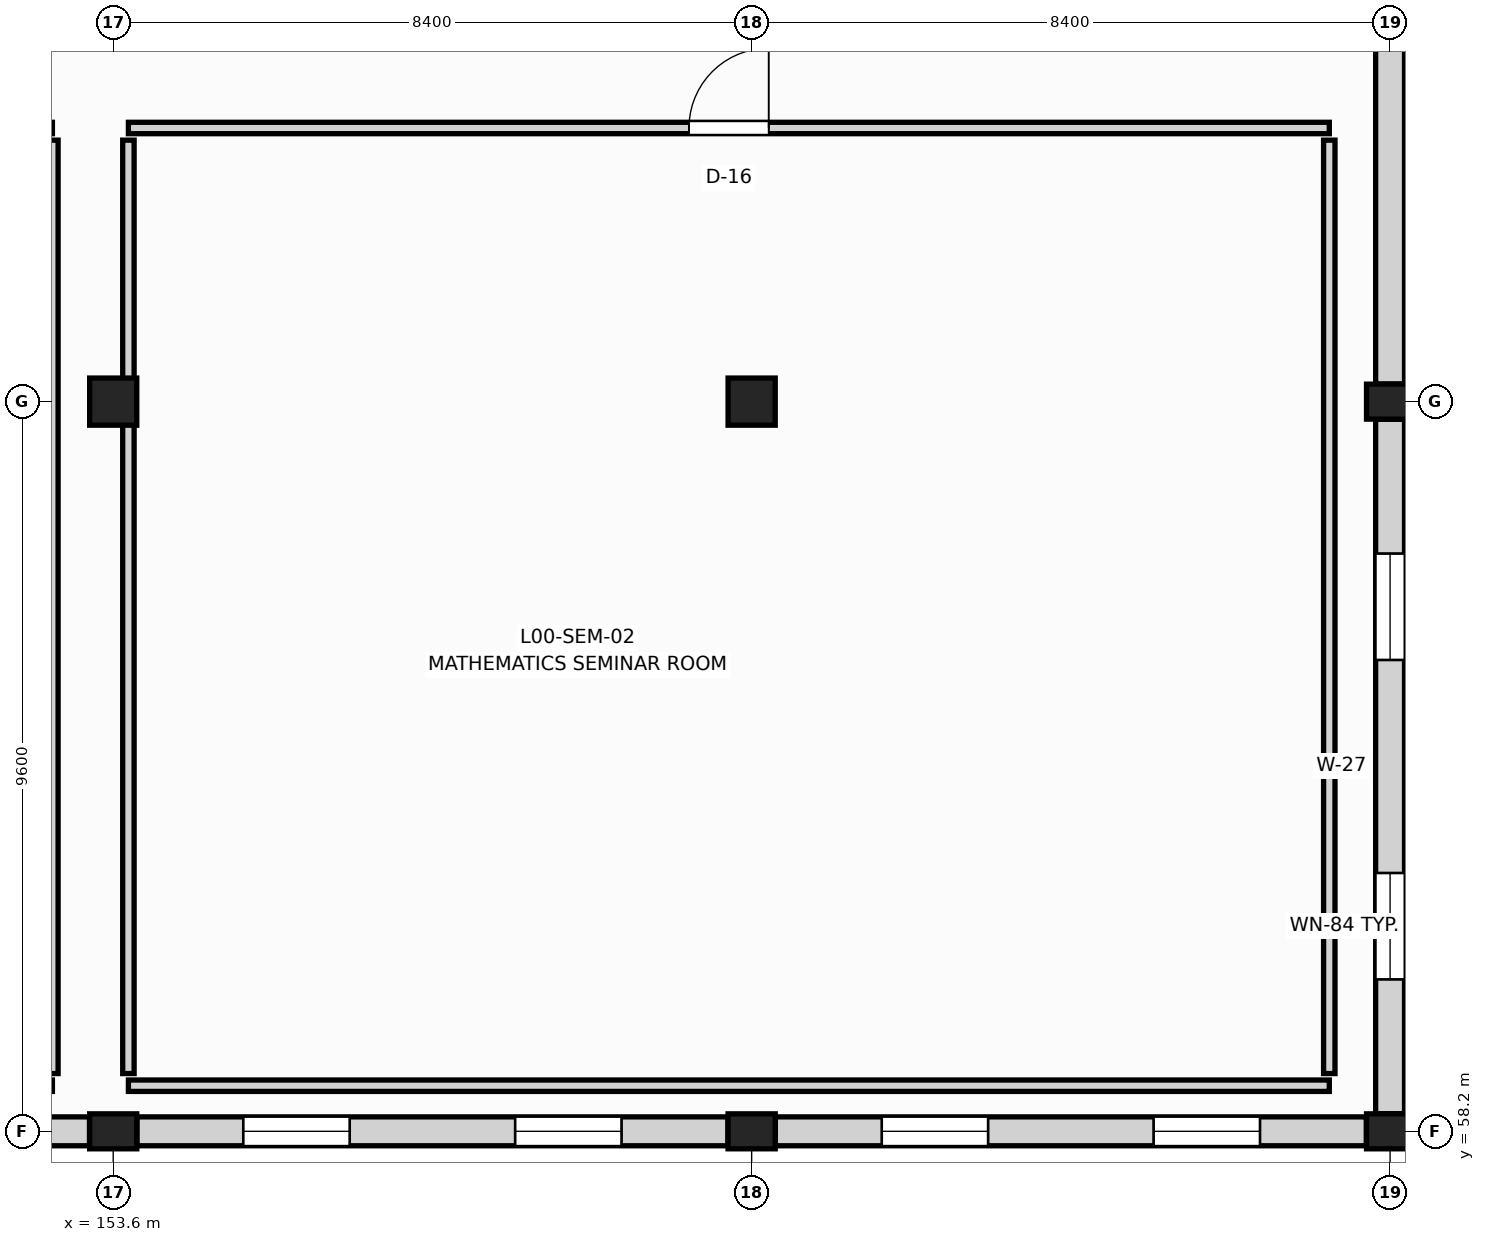
"""IFC4 building model, lengths in metres.
Left out: names, types, materials, properties, quantities, classifications, styles, units other than length and angle.
Written with IfcOpenShell. Run it as: python <this file> out.ifc"""

import sys

from ifc_helpers import new_model, si_unit, direction, frame, frame_2d, origin, origin_2d, place, context, subcontext, project, spatial, rectangle, extrude, element, fill, save


model = new_model("IFC4")
c1 = context("Model", 3, precision=1e-05, world=origin(), true_north=direction((0.0, 1.0)))
c2 = subcontext(c1, "Body", "Model", "MODEL_VIEW")
j1 = project(units=[si_unit("LENGTHUNIT", "METRE"), si_unit("PLANEANGLEUNIT", "RADIAN")], contexts=[c1])
p1 = place(None, origin())
s1 = spatial("IfcSite", under=j1, at=p1, CompositionType="ELEMENT")
p2 = place(p1, origin())
s2 = spatial("IfcBuilding", under=s1, at=p2, CompositionType="ELEMENT")
p3 = place(p2, origin())
s3 = spatial("IfcBuildingStorey", under=s2, at=p3, CompositionType="ELEMENT", Elevation=0.0)
p4 = place(p3, frame((153.6, 58.2, 0.0), z_axis=(0.0, 0.0, 1.0), x_axis=(1.0, 0.0, 0.0)))
e1 = element("IfcColumn", 1, at=p4, inside=s3, PredefinedType="COLUMN", context=c2, shape_type="SweptSolid", body=[
    extrude(rectangle(XDim=0.62, YDim=0.46, at=origin_2d()), origin(), (0.0, 0.0, 1.0), 5.08),
])
p5 = place(p3, frame((153.6, 67.8, 0.0), z_axis=(0.0, 0.0, 1.0), x_axis=(1.0, 0.0, 0.0)))
e2 = element("IfcColumn", 2, at=p5, inside=s3, PredefinedType="COLUMN", context=c2, shape_type="SweptSolid", body=[
    extrude(rectangle(XDim=0.62, YDim=0.62, at=origin_2d()), origin(), (0.0, 0.0, 1.0), 5.08),
])
p6 = place(p3, frame((162.0, 58.2, 0.0), z_axis=(0.0, 0.0, 1.0), x_axis=(1.0, 0.0, 0.0)))
e3 = element("IfcColumn", 3, at=p6, inside=s3, PredefinedType="COLUMN", context=c2, shape_type="SweptSolid", body=[
    extrude(rectangle(XDim=0.62, YDim=0.46, at=origin_2d()), origin(), (0.0, 0.0, 1.0), 5.08),
])
p7 = place(p3, frame((162.0, 67.8, 0.0), z_axis=(0.0, 0.0, 1.0), x_axis=(1.0, 0.0, 0.0)))
e4 = element("IfcColumn", 4, at=p7, inside=s3, PredefinedType="COLUMN", context=c2, shape_type="SweptSolid", body=[
    extrude(rectangle(XDim=0.62, YDim=0.62, at=origin_2d()), origin(), (0.0, 0.0, 1.0), 5.08),
])
for number, where, z_axis, x_axis in (
    (5, (170.4, 58.2, 0.0), (0.0, 0.0, 1.0), (1.0, 0.0, 0.0)),
    (6, (170.4, 67.8, 0.0), (0.0, 0.0, 1.0), (1.0, 0.0, 0.0)),
):
    element("IfcColumn", number, at=place(p3, frame(where, z_axis=z_axis, x_axis=x_axis)), inside=s3, PredefinedType="COLUMN", context=c2, shape_type="SweptSolid", body=[
        extrude(rectangle(XDim=0.62, YDim=0.46, at=origin_2d()), origin(), (0.0, 0.0, 1.0), 5.08),
    ])
p8 = place(p3, frame((170.4, 58.432, 0.0), z_axis=(0.0, 0.0, 1.0), x_axis=(0.0, 1.0, 0.0)))
e7 = element("IfcWall", 7, at=p8, inside=s3, PredefinedType="SOLIDWALL", context=c2, shape_type="SweptSolid", body=[
    extrude(rectangle(XDim=9.136, YDim=0.38, at=frame_2d((4.568, 0.0))), origin(), (0.0, 0.0, 1.0), 4.28),
])
p9 = place(p8, frame((1.767, 0.0, 0.85)))
e8 = element("IfcOpeningElement", 8, at=p9, cuts=e7, PredefinedType="OPENING", context=c2, shape_type="SweptSolid", body=[
    extrude(rectangle(XDim=1.4, YDim=1.65, at=frame_2d((0.7, 0.825))), frame((0.0, 0.2, 0.0), z_axis=(0.0, -1.0, 0.0), x_axis=(1.0, 0.0, 0.0)), (0.0, 0.0, 1.0), 0.4),
])
p10 = place(p8, frame((5.969, 0.0, 0.85)))
e9 = element("IfcOpeningElement", 9, at=p10, cuts=e7, PredefinedType="OPENING", context=c2, shape_type="SweptSolid", body=[
    extrude(rectangle(XDim=1.4, YDim=1.65, at=frame_2d((0.7, 0.825))), frame((0.0, 0.2, 0.0), z_axis=(0.0, -1.0, 0.0), x_axis=(1.0, 0.0, 0.0)), (0.0, 0.0, 1.0), 0.4),
])
p11 = place(p3, frame((170.4, 68.032, 0.0), z_axis=(0.0, 0.0, 1.0), x_axis=(0.0, 1.0, 0.0)))
e10 = element("IfcWall", 10, at=p11, inside=s3, PredefinedType="SOLIDWALL", context=c2, shape_type="SweptSolid", body=[
    extrude(rectangle(XDim=9.136, YDim=0.38, at=frame_2d((4.568, 0.0))), origin(), (0.0, 0.0, 1.0), 4.28),
])
p12 = place(p11, frame((4.618, 0.0, 0.0)))
e11 = element("IfcOpeningElement", 11, at=p12, cuts=e10, PredefinedType="OPENING", context=c2, shape_type="SweptSolid", body=[
    extrude(rectangle(XDim=1.5, YDim=2.2, at=frame_2d((0.75, 1.1))), frame((0.0, 0.2, 0.0), z_axis=(0.0, -1.0, 0.0), x_axis=(1.0, 0.0, 0.0)), (0.0, 0.0, 1.0), 0.4),
])
p13 = place(p3, frame((145.512, 58.2, 0.0), z_axis=(0.0, 0.0, 1.0), x_axis=(1.0, 0.0, 0.0)))
e12 = element("IfcWall", 12, at=p13, inside=s3, PredefinedType="SOLIDWALL", context=c2, shape_type="SweptSolid", body=[
    extrude(rectangle(XDim=7.776, YDim=0.38, at=frame_2d((3.888, 0.0))), origin(), (0.0, 0.0, 1.0), 4.28),
])
p14 = place(p13, frame((1.399, 0.0, 0.85)))
e13 = element("IfcOpeningElement", 13, at=p14, cuts=e12, PredefinedType="OPENING", context=c2, shape_type="SweptSolid", body=[
    extrude(rectangle(XDim=1.4, YDim=1.65, at=frame_2d((0.7, 0.825))), frame((0.0, 0.2, 0.0), z_axis=(0.0, -1.0, 0.0), x_axis=(1.0, 0.0, 0.0)), (0.0, 0.0, 1.0), 0.4),
])
p15 = place(p13, frame((4.977, 0.0, 0.85)))
e14 = element("IfcOpeningElement", 14, at=p15, cuts=e12, PredefinedType="OPENING", context=c2, shape_type="SweptSolid", body=[
    extrude(rectangle(XDim=1.4, YDim=1.65, at=frame_2d((0.7, 0.825))), frame((0.0, 0.2, 0.0), z_axis=(0.0, -1.0, 0.0), x_axis=(1.0, 0.0, 0.0)), (0.0, 0.0, 1.0), 0.4),
])
p16 = place(p3, frame((153.912, 58.2, 0.0), z_axis=(0.0, 0.0, 1.0), x_axis=(1.0, 0.0, 0.0)))
e15 = element("IfcWall", 15, at=p16, inside=s3, PredefinedType="SOLIDWALL", context=c2, shape_type="SweptSolid", body=[
    extrude(rectangle(XDim=7.776, YDim=0.38, at=frame_2d((3.888, 0.0))), origin(), (0.0, 0.0, 1.0), 4.28),
])
p17 = place(p16, frame((1.399, 0.0, 0.85)))
e16 = element("IfcOpeningElement", 16, at=p17, cuts=e15, PredefinedType="OPENING", context=c2, shape_type="SweptSolid", body=[
    extrude(rectangle(XDim=1.4, YDim=1.65, at=frame_2d((0.7, 0.825))), frame((0.0, 0.2, 0.0), z_axis=(0.0, -1.0, 0.0), x_axis=(1.0, 0.0, 0.0)), (0.0, 0.0, 1.0), 0.4),
])
p18 = place(p16, frame((4.977, 0.0, 0.85)))
e17 = element("IfcOpeningElement", 17, at=p18, cuts=e15, PredefinedType="OPENING", context=c2, shape_type="SweptSolid", body=[
    extrude(rectangle(XDim=1.4, YDim=1.65, at=frame_2d((0.7, 0.825))), frame((0.0, 0.2, 0.0), z_axis=(0.0, -1.0, 0.0), x_axis=(1.0, 0.0, 0.0)), (0.0, 0.0, 1.0), 0.4),
])
p19 = place(p3, frame((162.312, 58.2, 0.0), z_axis=(0.0, 0.0, 1.0), x_axis=(1.0, 0.0, 0.0)))
e18 = element("IfcWall", 18, at=p19, inside=s3, PredefinedType="SOLIDWALL", context=c2, shape_type="SweptSolid", body=[
    extrude(rectangle(XDim=7.776, YDim=0.38, at=frame_2d((3.888, 0.0))), origin(), (0.0, 0.0, 1.0), 4.28),
])
p20 = place(p19, frame((1.399, 0.0, 0.85)))
e19 = element("IfcOpeningElement", 19, at=p20, cuts=e18, PredefinedType="OPENING", context=c2, shape_type="SweptSolid", body=[
    extrude(rectangle(XDim=1.4, YDim=1.65, at=frame_2d((0.7, 0.825))), frame((0.0, 0.2, 0.0), z_axis=(0.0, -1.0, 0.0), x_axis=(1.0, 0.0, 0.0)), (0.0, 0.0, 1.0), 0.4),
])
p21 = place(p19, frame((4.977, 0.0, 0.85)))
e20 = element("IfcOpeningElement", 20, at=p21, cuts=e18, PredefinedType="OPENING", context=c2, shape_type="SweptSolid", body=[
    extrude(rectangle(XDim=1.4, YDim=1.65, at=frame_2d((0.7, 0.825))), frame((0.0, 0.2, 0.0), z_axis=(0.0, -1.0, 0.0), x_axis=(1.0, 0.0, 0.0)), (0.0, 0.0, 1.0), 0.4),
])
p22 = place(p3, frame((137.6, 58.8, 0.0), z_axis=(0.0, 0.0, 1.0), x_axis=(1.0, 0.0, 0.0)))
e21 = element("IfcWall", 21, at=p22, inside=s3, PredefinedType="PARTITIONING", context=c2, shape_type="SweptSolid", body=[
    extrude(rectangle(XDim=15.2, YDim=0.15, at=frame_2d((7.6, 0.0))), origin(), (0.0, 0.0, 1.0), 4.12),
])
p23 = place(p3, frame((137.6, 71.4, 0.0), z_axis=(0.0, 0.0, 1.0), x_axis=(1.0, 0.0, 0.0)))
e22 = element("IfcWall", 22, at=p23, inside=s3, PredefinedType="PARTITIONING", context=c2, shape_type="SweptSolid", body=[
    extrude(rectangle(XDim=15.2, YDim=0.15, at=frame_2d((7.6, 0.0))), origin(), (0.0, 0.0, 1.0), 4.12),
])
p24 = place(p23, frame((7.075, 0.0, 0.0)))
e23 = element("IfcOpeningElement", 23, at=p24, cuts=e22, PredefinedType="OPENING", context=c2, shape_type="SweptSolid", body=[
    extrude(rectangle(XDim=1.05, YDim=2.2, at=frame_2d((0.525, 1.1))), frame((0.0, 0.085, 0.0), z_axis=(0.0, -1.0, 0.0), x_axis=(1.0, 0.0, 0.0)), (0.0, 0.0, 1.0), 0.17),
])
p25 = place(p3, frame((152.8, 58.96, 0.0), z_axis=(0.0, 0.0, 1.0), x_axis=(0.0, 1.0, 0.0)))
e24 = element("IfcWall", 24, at=p25, inside=s3, PredefinedType="PARTITIONING", context=c2, shape_type="SweptSolid", body=[
    extrude(rectangle(XDim=12.28, YDim=0.15, at=frame_2d((6.14, 0.0))), origin(), (0.0, 0.0, 1.0), 4.12),
])
p26 = place(p3, frame((153.8, 58.8, 0.0), z_axis=(0.0, 0.0, 1.0), x_axis=(1.0, 0.0, 0.0)))
e25 = element("IfcWall", 25, at=p26, inside=s3, PredefinedType="PARTITIONING", context=c2, shape_type="SweptSolid", body=[
    extrude(rectangle(XDim=15.8, YDim=0.15, at=frame_2d((7.9, 0.0))), origin(), (0.0, 0.0, 1.0), 4.12),
])
p27 = place(p3, frame((153.8, 71.4, 0.0), z_axis=(0.0, 0.0, 1.0), x_axis=(1.0, 0.0, 0.0)))
e26 = element("IfcWall", 26, at=p27, inside=s3, PredefinedType="PARTITIONING", context=c2, shape_type="SweptSolid", body=[
    extrude(rectangle(XDim=15.8, YDim=0.15, at=frame_2d((7.9, 0.0))), origin(), (0.0, 0.0, 1.0), 4.12),
])
p28 = place(p27, frame((7.375, 0.0, 0.0)))
e27 = element("IfcOpeningElement", 27, at=p28, cuts=e26, PredefinedType="OPENING", context=c2, shape_type="SweptSolid", body=[
    extrude(rectangle(XDim=1.05, YDim=2.2, at=frame_2d((0.525, 1.1))), frame((0.0, 0.085, 0.0), z_axis=(0.0, -1.0, 0.0), x_axis=(1.0, 0.0, 0.0)), (0.0, 0.0, 1.0), 0.17),
])
for number, where, z_axis, x_axis in (
    (28, (153.8, 58.96, 0.0), (0.0, 0.0, 1.0), (0.0, 1.0, 0.0)),
    (29, (169.6, 58.96, 0.0), (0.0, 0.0, 1.0), (0.0, 1.0, 0.0)),
):
    element("IfcWall", number, at=place(p3, frame(where, z_axis=z_axis, x_axis=x_axis)), inside=s3, PredefinedType="PARTITIONING", context=c2, shape_type="SweptSolid", body=[
        extrude(rectangle(XDim=12.28, YDim=0.15, at=frame_2d((6.14, 0.0))), origin(), (0.0, 0.0, 1.0), 4.12),
    ])
p29 = place(p9, origin())
e30 = element("IfcWindow", 30, at=p29, inside=s3, PartitioningType="SINGLE_PANEL", PredefinedType="WINDOW", context=c2, shape_type="SweptSolid", body=[
    extrude(rectangle(XDim=1.4, YDim=1.65, at=frame_2d((0.7, 0.825))), frame((0.0, 0.03, 0.0), z_axis=(0.0, -1.0, 0.0), x_axis=(1.0, 0.0, 0.0)), (0.0, 0.0, 1.0), 0.06),
])
fill(e8, e30)
p30 = place(p10, origin())
e31 = element("IfcWindow", 31, at=p30, inside=s3, PartitioningType="SINGLE_PANEL", PredefinedType="WINDOW", context=c2, shape_type="SweptSolid", body=[
    extrude(rectangle(XDim=1.4, YDim=1.65, at=frame_2d((0.7, 0.825))), frame((0.0, 0.03, 0.0), z_axis=(0.0, -1.0, 0.0), x_axis=(1.0, 0.0, 0.0)), (0.0, 0.0, 1.0), 0.06),
])
fill(e9, e31)
p31 = place(p17, origin())
e32 = element("IfcWindow", 32, at=p31, inside=s3, PartitioningType="SINGLE_PANEL", PredefinedType="WINDOW", context=c2, shape_type="SweptSolid", body=[
    extrude(rectangle(XDim=1.4, YDim=1.65, at=frame_2d((0.7, 0.825))), frame((0.0, 0.03, 0.0), z_axis=(0.0, -1.0, 0.0), x_axis=(1.0, 0.0, 0.0)), (0.0, 0.0, 1.0), 0.06),
])
fill(e16, e32)
p32 = place(p18, origin())
e33 = element("IfcWindow", 33, at=p32, inside=s3, PartitioningType="SINGLE_PANEL", PredefinedType="WINDOW", context=c2, shape_type="SweptSolid", body=[
    extrude(rectangle(XDim=1.4, YDim=1.65, at=frame_2d((0.7, 0.825))), frame((0.0, 0.03, 0.0), z_axis=(0.0, -1.0, 0.0), x_axis=(1.0, 0.0, 0.0)), (0.0, 0.0, 1.0), 0.06),
])
fill(e17, e33)
p33 = place(p20, origin())
e34 = element("IfcWindow", 34, at=p33, inside=s3, PartitioningType="SINGLE_PANEL", PredefinedType="WINDOW", context=c2, shape_type="SweptSolid", body=[
    extrude(rectangle(XDim=1.4, YDim=1.65, at=frame_2d((0.7, 0.825))), frame((0.0, 0.03, 0.0), z_axis=(0.0, -1.0, 0.0), x_axis=(1.0, 0.0, 0.0)), (0.0, 0.0, 1.0), 0.06),
])
fill(e19, e34)
p34 = place(p21, origin())
e35 = element("IfcWindow", 35, at=p34, inside=s3, PartitioningType="SINGLE_PANEL", PredefinedType="WINDOW", context=c2, shape_type="SweptSolid", body=[
    extrude(rectangle(XDim=1.4, YDim=1.65, at=frame_2d((0.7, 0.825))), frame((0.0, 0.03, 0.0), z_axis=(0.0, -1.0, 0.0), x_axis=(1.0, 0.0, 0.0)), (0.0, 0.0, 1.0), 0.06),
])
fill(e20, e35)
p35 = place(p28, origin())
e36 = element("IfcDoor", 36, at=p35, inside=s3, OperationType="SINGLE_SWING_RIGHT", PredefinedType="DOOR", context=c2, shape_type="SweptSolid", body=[
    extrude(rectangle(XDim=1.05, YDim=2.2, at=frame_2d((0.525, 1.1))), frame((0.0, 0.025, 0.0), z_axis=(0.0, -1.0, 0.0), x_axis=(1.0, 0.0, 0.0)), (0.0, 0.0, 1.0), 0.05),
])
fill(e27, e36)
save(model, sys.argv[1])
